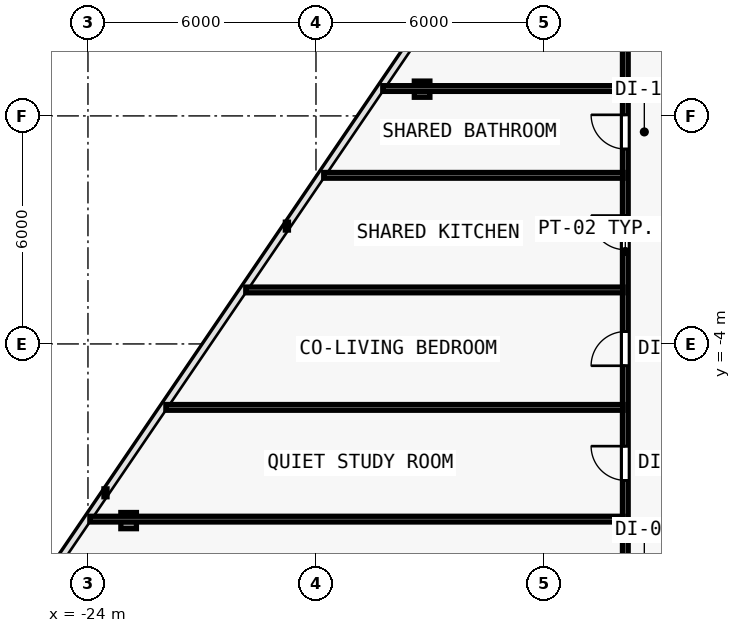
"""IFC4 building model, lengths in metres.
Left out: names, types, materials, properties, quantities, classifications, styles, units other than length and angle.
Written with IfcOpenShell. Run it as: python <this file> out.ifc"""

import sys

from ifc_helpers import new_model, si_unit, direction, frame, frame_2d, origin, origin_2d, place, context, subcontext, project, spatial, rectangle, i_section, extrude, element, fill, save


model = new_model("IFC4")
c1 = context("Model", 3, precision=1e-05, world=origin(), true_north=direction((0.0, 1.0)))
c2 = subcontext(c1, "Body", "Model", "MODEL_VIEW")
j1 = project(units=[si_unit("LENGTHUNIT", "METRE"), si_unit("PLANEANGLEUNIT", "RADIAN")], contexts=[c1])
p1 = place(None, origin())
s1 = spatial("IfcSite", under=j1, at=p1, CompositionType="ELEMENT")
p2 = place(p1, origin())
s2 = spatial("IfcBuilding", under=s1, at=p2, CompositionType="ELEMENT")
p3 = place(p2, frame((0.0, 0.0, 86.1)))
s3 = spatial("IfcBuildingStorey", under=s2, at=p3, CompositionType="ELEMENT", Elevation=86.1)
p4 = place(p3, frame((-15.208, 2.703, 0.005), z_axis=(0.017070395515, 0.009589345688, 0.99980830465), x_axis=(-0.489766415861, 0.871853690647, 0.0)))
e1 = element("IfcColumn", 1, at=p4, inside=s3, PredefinedType="COLUMN", context=c2, shape_type="SweptSolid", body=[
    extrude(i_section(OverallWidth=0.409, OverallDepth=0.425, WebThickness=0.021, FlangeThickness=0.034, FilletRadius=0.015, at=origin_2d()), origin(), (0.0, 0.0, 1.0), 3.59),
])
p5 = place(p3, frame((-22.93, -8.648, 0.005), z_axis=(0.025222449659, 0.021619242565, 0.999448065876), x_axis=(-0.650791373456, 0.759256602365, 0.0)))
e2 = element("IfcColumn", 2, at=p5, inside=s3, PredefinedType="COLUMN", context=c2, shape_type="SweptSolid", body=[
    extrude(i_section(OverallWidth=0.409, OverallDepth=0.425, WebThickness=0.021, FlangeThickness=0.034, FilletRadius=0.015, at=origin_2d()), origin(), (0.0, 0.0, 1.0), 3.591),
])
p6 = place(p3, frame((-9.86, -11.56, 0.0), z_axis=(0.0, 0.0, 1.0), x_axis=(0.0, 1.0, 0.0)))
e3 = element("IfcWall", 3, at=p6, inside=s3, PredefinedType="PARTITIONING", context=c2, shape_type="SweptSolid", body=[
    extrude(rectangle(XDim=19.986, YDim=0.15, at=frame_2d((9.993, 0.0))), origin(), (0.0, 0.0, 1.0), 2.609),
])
p7 = place(p6, frame((10.039, 0.0, 0.0)))
e4 = element("IfcOpeningElement", 4, at=p7, cuts=e3, PredefinedType="OPENING", context=c2, shape_type="SweptSolid", body=[
    extrude(rectangle(XDim=0.9, YDim=2.1, at=frame_2d((0.45, 1.05))), frame((0.0, 0.085, 0.0), z_axis=(0.0, -1.0, 0.0), x_axis=(1.0, 0.0, 0.0)), (0.0, 0.0, 1.0), 0.17),
])
p8 = place(p6, frame((6.986, 0.0, 0.0)))
e5 = element("IfcOpeningElement", 5, at=p8, cuts=e3, PredefinedType="OPENING", context=c2, shape_type="SweptSolid", body=[
    extrude(rectangle(XDim=0.9, YDim=2.1, at=frame_2d((0.45, 1.05))), frame((0.0, 0.085, 0.0), z_axis=(0.0, -1.0, 0.0), x_axis=(1.0, 0.0, 0.0)), (0.0, 0.0, 1.0), 0.17),
])
p9 = place(p6, frame((3.971, 0.0, 0.0)))
e6 = element("IfcOpeningElement", 6, at=p9, cuts=e3, PredefinedType="OPENING", context=c2, shape_type="SweptSolid", body=[
    extrude(rectangle(XDim=0.9, YDim=2.1, at=frame_2d((0.45, 1.05))), frame((0.0, 0.085, 0.0), z_axis=(0.0, -1.0, 0.0), x_axis=(1.0, 0.0, 0.0)), (0.0, 0.0, 1.0), 0.17),
])
p10 = place(p6, frame((1.115, 0.0, 0.0)))
e7 = element("IfcOpeningElement", 7, at=p10, cuts=e3, PredefinedType="OPENING", context=c2, shape_type="SweptSolid", body=[
    extrude(rectangle(XDim=0.9, YDim=2.1, at=frame_2d((0.45, 1.05))), frame((0.0, 0.085, 0.0), z_axis=(0.0, -1.0, 0.0), x_axis=(1.0, 0.0, 0.0)), (0.0, 0.0, 1.0), 0.17),
])
p11 = place(p6, frame((12.688, 0.0, 0.0)))
e8 = element("IfcOpeningElement", 8, at=p11, cuts=e3, PredefinedType="OPENING", context=c2, shape_type="SweptSolid", body=[
    extrude(rectangle(XDim=0.9, YDim=2.1, at=frame_2d((0.45, 1.05))), frame((0.0, 0.085, 0.0), z_axis=(0.0, -1.0, 0.0), x_axis=(1.0, 0.0, 0.0)), (0.0, 0.0, 1.0), 0.17),
])
p12 = place(p3, frame((-9.92, 2.72, 0.0), z_axis=(0.0, 0.0, 1.0), x_axis=(-1.0, 0.0, 0.0)))
e9 = element("IfcWall", 9, at=p12, inside=s3, PredefinedType="PARTITIONING", context=c2, shape_type="SweptSolid", body=[
    extrude(rectangle(XDim=6.322, YDim=0.15, at=frame_2d((3.161, 0.0))), origin(), (0.0, 0.0, 1.0), 2.835),
])
p13 = place(p3, frame((-9.92, -8.609, 0.0), z_axis=(0.0, 0.0, 1.0), x_axis=(-1.0, 0.0, 0.0)))
e10 = element("IfcWall", 10, at=p13, inside=s3, PredefinedType="PARTITIONING", context=c2, shape_type="SweptSolid", body=[
    extrude(rectangle(XDim=14.03, YDim=0.15, at=frame_2d((7.015, 0.0))), origin(), (0.0, 0.0, 1.0), 2.609),
])
p14 = place(p3, frame((-9.92, -2.579, 0.0), z_axis=(0.0, 0.0, 1.0), x_axis=(-1.0, 0.0, 0.0)))
e11 = element("IfcWall", 11, at=p14, inside=s3, PredefinedType="PARTITIONING", context=c2, shape_type="SweptSolid", body=[
    extrude(rectangle(XDim=9.927, YDim=0.15, at=frame_2d((4.964, 0.0))), origin(), (0.0, 0.0, 1.0), 2.835),
])
p15 = place(p3, frame((-9.92, 0.437, 0.0), z_axis=(0.0, 0.0, 1.0), x_axis=(-1.0, 0.0, 0.0)))
e12 = element("IfcWall", 12, at=p15, inside=s3, PredefinedType="PARTITIONING", context=c2, shape_type="SweptSolid", body=[
    extrude(rectangle(XDim=7.876, YDim=0.15, at=frame_2d((3.938, 0.0))), origin(), (0.0, 0.0, 1.0), 2.835),
])
p16 = place(p3, frame((-9.92, -5.669, 0.0), z_axis=(0.0, 0.0, 1.0), x_axis=(-1.0, 0.0, 0.0)))
e13 = element("IfcWall", 13, at=p16, inside=s3, PredefinedType="PARTITIONING", context=c2, shape_type="SweptSolid", body=[
    extrude(rectangle(XDim=12.03, YDim=0.15, at=frame_2d((6.015, 0.0))), origin(), (0.0, 0.0, 1.0), 2.835),
])
p17 = place(p7, origin())
e14 = element("IfcDoor", 14, at=p17, inside=s3, OperationType="SINGLE_SWING_RIGHT", PredefinedType="DOOR", context=c2, shape_type="SweptSolid", body=[
    extrude(rectangle(XDim=0.9, YDim=2.1, at=frame_2d((0.45, 1.05))), frame((0.0, 0.025, 0.0), z_axis=(0.0, -1.0, 0.0), x_axis=(1.0, 0.0, 0.0)), (0.0, 0.0, 1.0), 0.05),
])
fill(e4, e14)
p18 = place(p8, origin())
e15 = element("IfcDoor", 15, at=p18, inside=s3, OperationType="SINGLE_SWING_LEFT", PredefinedType="DOOR", context=c2, shape_type="SweptSolid", body=[
    extrude(rectangle(XDim=0.9, YDim=2.1, at=frame_2d((0.45, 1.05))), frame((0.0, 0.025, 0.0), z_axis=(0.0, -1.0, 0.0), x_axis=(1.0, 0.0, 0.0)), (0.0, 0.0, 1.0), 0.05),
])
fill(e5, e15)
p19 = place(p9, origin())
e16 = element("IfcDoor", 16, at=p19, inside=s3, OperationType="SINGLE_SWING_RIGHT", PredefinedType="DOOR", context=c2, shape_type="SweptSolid", body=[
    extrude(rectangle(XDim=0.9, YDim=2.1, at=frame_2d((0.45, 1.05))), frame((0.0, 0.025, 0.0), z_axis=(0.0, -1.0, 0.0), x_axis=(1.0, 0.0, 0.0)), (0.0, 0.0, 1.0), 0.05),
])
fill(e6, e16)
p20 = place(p11, origin())
e17 = element("IfcDoor", 17, at=p20, inside=s3, OperationType="SINGLE_SWING_RIGHT", PredefinedType="DOOR", context=c2, shape_type="SweptSolid", body=[
    extrude(rectangle(XDim=0.9, YDim=2.1, at=frame_2d((0.45, 1.05))), frame((0.0, 0.025, 0.0), z_axis=(0.0, -1.0, 0.0), x_axis=(1.0, 0.0, 0.0)), (0.0, 0.0, 1.0), 0.05),
])
fill(e8, e17)
save(model, sys.argv[1])
